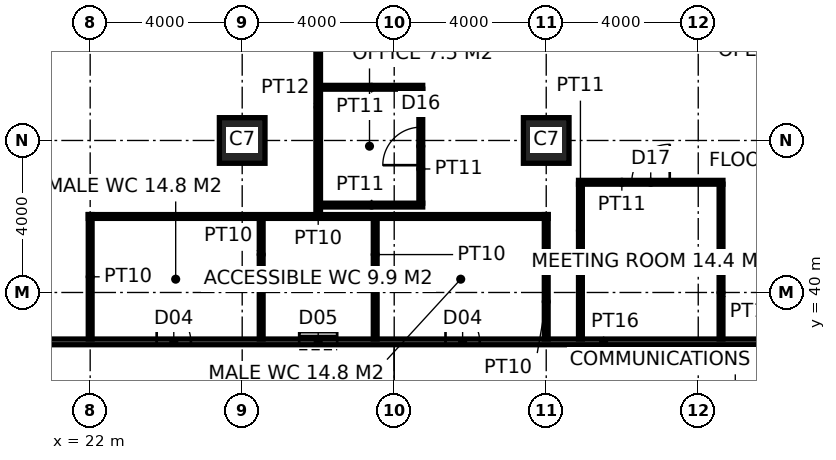
"""IFC4 building model, lengths in metres.
Left out: names, types, materials, properties, quantities, classifications, styles, units other than length and angle.
Written with IfcOpenShell. Run it as: python <this file> out.ifc"""

import sys

from ifc_helpers import new_model, si_unit, direction, frame, frame_2d, origin, origin_2d, place, context, subcontext, project, spatial, rectangle, hollow_rectangle, extrude, element, fill, save


model = new_model("IFC4")
c1 = context("Model", 3, precision=1e-05, world=origin(), true_north=direction((0.0, 1.0)))
c2 = subcontext(c1, "Body", "Model", "MODEL_VIEW")
j1 = project(units=[si_unit("LENGTHUNIT", "METRE"), si_unit("PLANEANGLEUNIT", "RADIAN")], contexts=[c1])
p1 = place(None, origin())
s1 = spatial("IfcSite", under=j1, at=p1, CompositionType="ELEMENT")
p2 = place(p1, origin())
s2 = spatial("IfcBuilding", under=s1, at=p2, CompositionType="ELEMENT")
p3 = place(p2, frame((0.0, 0.0, 47.0)))
s3 = spatial("IfcBuildingStorey", under=s2, at=p3, CompositionType="ELEMENT", Elevation=47.0)
for number, where, z_axis, x_axis in (
    (1, (26.0, 44.0, 0.0), (0.0, 0.0, 1.0), (1.0, 0.0, 0.0)),
    (2, (34.0, 44.0, 0.0), (0.0, 0.0, 1.0), (1.0, 0.0, 0.0)),
):
    element("IfcColumn", number, at=place(p3, frame(where, z_axis=z_axis, x_axis=x_axis)), inside=s3, PredefinedType="COLUMN", context=c2, shape_type="SweptSolid", body=[
        extrude(hollow_rectangle(XDim=1.2, YDim=1.2, WallThickness=0.1, at=origin_2d()), origin(), (0.0, 0.0, 1.0), 4.0),
    ])
p4 = place(p3, frame((15.175, 38.7, 0.0), z_axis=(0.0, 0.0, 1.0), x_axis=(1.0, 0.0, 0.0)))
e3 = element("IfcWall", 3, at=p4, inside=s3, PredefinedType="PARTITIONING", context=c2, shape_type="SweptSolid", body=[
    extrude(rectangle(XDim=29.05, YDim=0.15, at=frame_2d((14.525, 0.0))), origin(), (0.0, 0.0, 1.0), 3.85),
])
p5 = place(p4, frame((8.575, 0.0, 0.0)))
e4 = element("IfcOpeningElement", 4, at=p5, cuts=e3, PredefinedType="OPENING", context=c2, shape_type="SweptSolid", body=[
    extrude(rectangle(XDim=0.9, YDim=2.1, at=frame_2d((0.45, 1.05))), frame((0.0, 0.085, 0.0), z_axis=(0.0, -1.0, 0.0), x_axis=(1.0, 0.0, 0.0)), (0.0, 0.0, 1.0), 0.17),
])
p6 = place(p4, frame((12.325, 0.0, 0.0)))
e5 = element("IfcOpeningElement", 5, at=p6, cuts=e3, PredefinedType="OPENING", context=c2, shape_type="SweptSolid", body=[
    extrude(rectangle(XDim=1.0, YDim=2.1, at=frame_2d((0.5, 1.05))), frame((0.0, 0.085, 0.0), z_axis=(0.0, -1.0, 0.0), x_axis=(1.0, 0.0, 0.0)), (0.0, 0.0, 1.0), 0.17),
])
p7 = place(p4, frame((16.175, 0.0, 0.0)))
e6 = element("IfcOpeningElement", 6, at=p7, cuts=e3, PredefinedType="OPENING", context=c2, shape_type="SweptSolid", body=[
    extrude(rectangle(XDim=0.9, YDim=2.1, at=frame_2d((0.45, 1.05))), frame((0.0, 0.085, 0.0), z_axis=(0.0, -1.0, 0.0), x_axis=(1.0, 0.0, 0.0)), (0.0, 0.0, 1.0), 0.17),
])
for number, where, z_axis, x_axis in (
    (7, (22.0, 38.775, 0.0), (0.0, 0.0, 1.0), (0.0, 1.0, 0.0)),
    (8, (34.0, 38.775, 0.0), (0.0, 0.0, 1.0), (0.0, 1.0, 0.0)),
):
    element("IfcWall", number, at=place(p3, frame(where, z_axis=z_axis, x_axis=x_axis)), inside=s3, PredefinedType="PARTITIONING", context=c2, shape_type="SweptSolid", body=[
        extrude(rectangle(XDim=3.275, YDim=0.1, at=frame_2d((1.638, 0.0))), origin(), (0.0, 0.0, 1.0), 2.95),
    ])
p8 = place(p3, frame((21.95, 42.0, 0.0), z_axis=(0.0, 0.0, 1.0), x_axis=(1.0, 0.0, 0.0)))
e9 = element("IfcWall", 9, at=p8, inside=s3, PredefinedType="PARTITIONING", context=c2, shape_type="SweptSolid", body=[
    extrude(rectangle(XDim=12.1, YDim=0.1, at=frame_2d((6.05, 0.0))), origin(), (0.0, 0.0, 1.0), 3.85),
])
for number, where, z_axis, x_axis in (
    (10, (26.5, 38.775, 0.0), (0.0, 0.0, 1.0), (0.0, 1.0, 0.0)),
    (11, (29.5, 38.775, 0.0), (0.0, 0.0, 1.0), (0.0, 1.0, 0.0)),
):
    element("IfcWall", number, at=place(p3, frame(where, z_axis=z_axis, x_axis=x_axis)), inside=s3, PredefinedType="PARTITIONING", context=c2, shape_type="SweptSolid", body=[
        extrude(rectangle(XDim=3.175, YDim=0.1, at=frame_2d((1.587, 0.0))), origin(), (0.0, 0.0, 1.0), 3.85),
    ])
p9 = place(p3, frame((28.0, 42.05, 0.0), z_axis=(0.0, 0.0, 1.0), x_axis=(0.0, 1.0, 0.0)))
e12 = element("IfcWall", 12, at=p9, inside=s3, PredefinedType="PARTITIONING", context=c2, shape_type="SweptSolid", body=[
    extrude(rectangle(XDim=5.65, YDim=0.12, at=frame_2d((2.825, 0.0))), origin(), (0.0, 0.0, 1.0), 3.85),
])
p10 = place(p3, frame((28.06, 42.3, 0.0), z_axis=(0.0, 0.0, 1.0), x_axis=(1.0, 0.0, 0.0)))
e13 = element("IfcWall", 13, at=p10, inside=s3, PredefinedType="PARTITIONING", context=c2, shape_type="SweptSolid", body=[
    extrude(rectangle(XDim=2.69, YDim=0.1, at=frame_2d((1.345, 0.0))), origin(), (0.0, 0.0, 1.0), 3.85),
])
p11 = place(p3, frame((34.85, 42.9, 0.0), z_axis=(0.0, 0.0, 1.0), x_axis=(1.0, 0.0, 0.0)))
e14 = element("IfcWall", 14, at=p11, inside=s3, PredefinedType="PARTITIONING", context=c2, shape_type="SweptSolid", body=[
    extrude(rectangle(XDim=3.8, YDim=0.1, at=frame_2d((1.9, 0.0))), origin(), (0.0, 0.0, 1.0), 3.85),
])
p12 = place(p11, frame((1.4, 0.0, 0.0)))
e15 = element("IfcOpeningElement", 15, at=p12, cuts=e14, PredefinedType="OPENING", context=c2, shape_type="SweptSolid", body=[
    extrude(rectangle(XDim=1.0, YDim=2.2, at=frame_2d((0.5, 1.1))), frame((0.0, 0.06, 0.0), z_axis=(0.0, -1.0, 0.0), x_axis=(1.0, 0.0, 0.0)), (0.0, 0.0, 1.0), 0.12),
])
p13 = place(p3, frame((28.06, 45.4, 0.0), z_axis=(0.0, 0.0, 1.0), x_axis=(1.0, 0.0, 0.0)))
e16 = element("IfcWall", 16, at=p13, inside=s3, PredefinedType="PARTITIONING", context=c2, shape_type="SweptSolid", body=[
    extrude(rectangle(XDim=2.69, YDim=0.1, at=frame_2d((1.345, 0.0))), origin(), (0.0, 0.0, 1.0), 3.85),
])
p14 = place(p3, frame((30.7, 42.35, 0.0), z_axis=(0.0, 0.0, 1.0), x_axis=(0.0, 1.0, 0.0)))
e17 = element("IfcWall", 17, at=p14, inside=s3, PredefinedType="PARTITIONING", context=c2, shape_type="SweptSolid", body=[
    extrude(rectangle(XDim=3.0, YDim=0.1, at=frame_2d((1.5, 0.0))), origin(), (0.0, 0.0, 1.0), 3.85),
])
p15 = place(p14, frame((1.0, 0.0, 0.0)))
e18 = element("IfcOpeningElement", 18, at=p15, cuts=e17, PredefinedType="OPENING", context=c2, shape_type="SweptSolid", body=[
    extrude(rectangle(XDim=1.0, YDim=2.2, at=frame_2d((0.5, 1.1))), frame((0.0, 0.06, 0.0), z_axis=(0.0, -1.0, 0.0), x_axis=(1.0, 0.0, 0.0)), (0.0, 0.0, 1.0), 0.12),
])
for number, where, z_axis, x_axis in (
    (19, (34.9, 38.775, 0.0), (0.0, 0.0, 1.0), (0.0, 1.0, 0.0)),
    (20, (38.6, 38.775, 0.0), (0.0, 0.0, 1.0), (0.0, 1.0, 0.0)),
):
    element("IfcWall", number, at=place(p3, frame(where, z_axis=z_axis, x_axis=x_axis)), inside=s3, PredefinedType="PARTITIONING", context=c2, shape_type="SweptSolid", body=[
        extrude(rectangle(XDim=4.075, YDim=0.1, at=frame_2d((2.038, 0.0))), origin(), (0.0, 0.0, 1.0), 3.85),
    ])
p16 = place(p5, origin())
e21 = element("IfcDoor", 21, at=p16, inside=s3, OperationType="SINGLE_SWING_LEFT", PredefinedType="DOOR", context=c2, shape_type="SweptSolid", body=[
    extrude(rectangle(XDim=0.9, YDim=2.1, at=frame_2d((0.45, 1.05))), frame((0.0, 0.025, 0.0), z_axis=(0.0, -1.0, 0.0), x_axis=(1.0, 0.0, 0.0)), (0.0, 0.0, 1.0), 0.05),
])
fill(e4, e21)
p17 = place(p6, origin())
e22 = element("IfcDoor", 22, at=p17, inside=s3, OperationType="SLIDING_TO_LEFT", PredefinedType="DOOR", context=c2, shape_type="SweptSolid", body=[
    extrude(rectangle(XDim=1.0, YDim=2.1, at=frame_2d((0.5, 1.05))), frame((0.0, 0.025, 0.0), z_axis=(0.0, -1.0, 0.0), x_axis=(1.0, 0.0, 0.0)), (0.0, 0.0, 1.0), 0.05),
])
fill(e5, e22)
p18 = place(p7, origin())
e23 = element("IfcDoor", 23, at=p18, inside=s3, OperationType="SINGLE_SWING_LEFT", PredefinedType="DOOR", context=c2, shape_type="SweptSolid", body=[
    extrude(rectangle(XDim=0.9, YDim=2.1, at=frame_2d((0.45, 1.05))), frame((0.0, 0.025, 0.0), z_axis=(0.0, -1.0, 0.0), x_axis=(1.0, 0.0, 0.0)), (0.0, 0.0, 1.0), 0.05),
])
fill(e6, e23)
p19 = place(p12, origin())
e24 = element("IfcDoor", 24, at=p19, inside=s3, OperationType="SINGLE_SWING_RIGHT", PredefinedType="DOOR", context=c2, shape_type="SweptSolid", body=[
    extrude(rectangle(XDim=1.0, YDim=2.2, at=frame_2d((0.5, 1.1))), frame((0.0, 0.025, 0.0), z_axis=(0.0, -1.0, 0.0), x_axis=(1.0, 0.0, 0.0)), (0.0, 0.0, 1.0), 0.05),
])
fill(e15, e24)
p20 = place(p15, origin())
e25 = element("IfcDoor", 25, at=p20, inside=s3, OperationType="SINGLE_SWING_LEFT", PredefinedType="DOOR", context=c2, shape_type="SweptSolid", body=[
    extrude(rectangle(XDim=1.0, YDim=2.2, at=frame_2d((0.5, 1.1))), frame((0.0, 0.025, 0.0), z_axis=(0.0, -1.0, 0.0), x_axis=(1.0, 0.0, 0.0)), (0.0, 0.0, 1.0), 0.05),
])
fill(e18, e25)
save(model, sys.argv[1])
